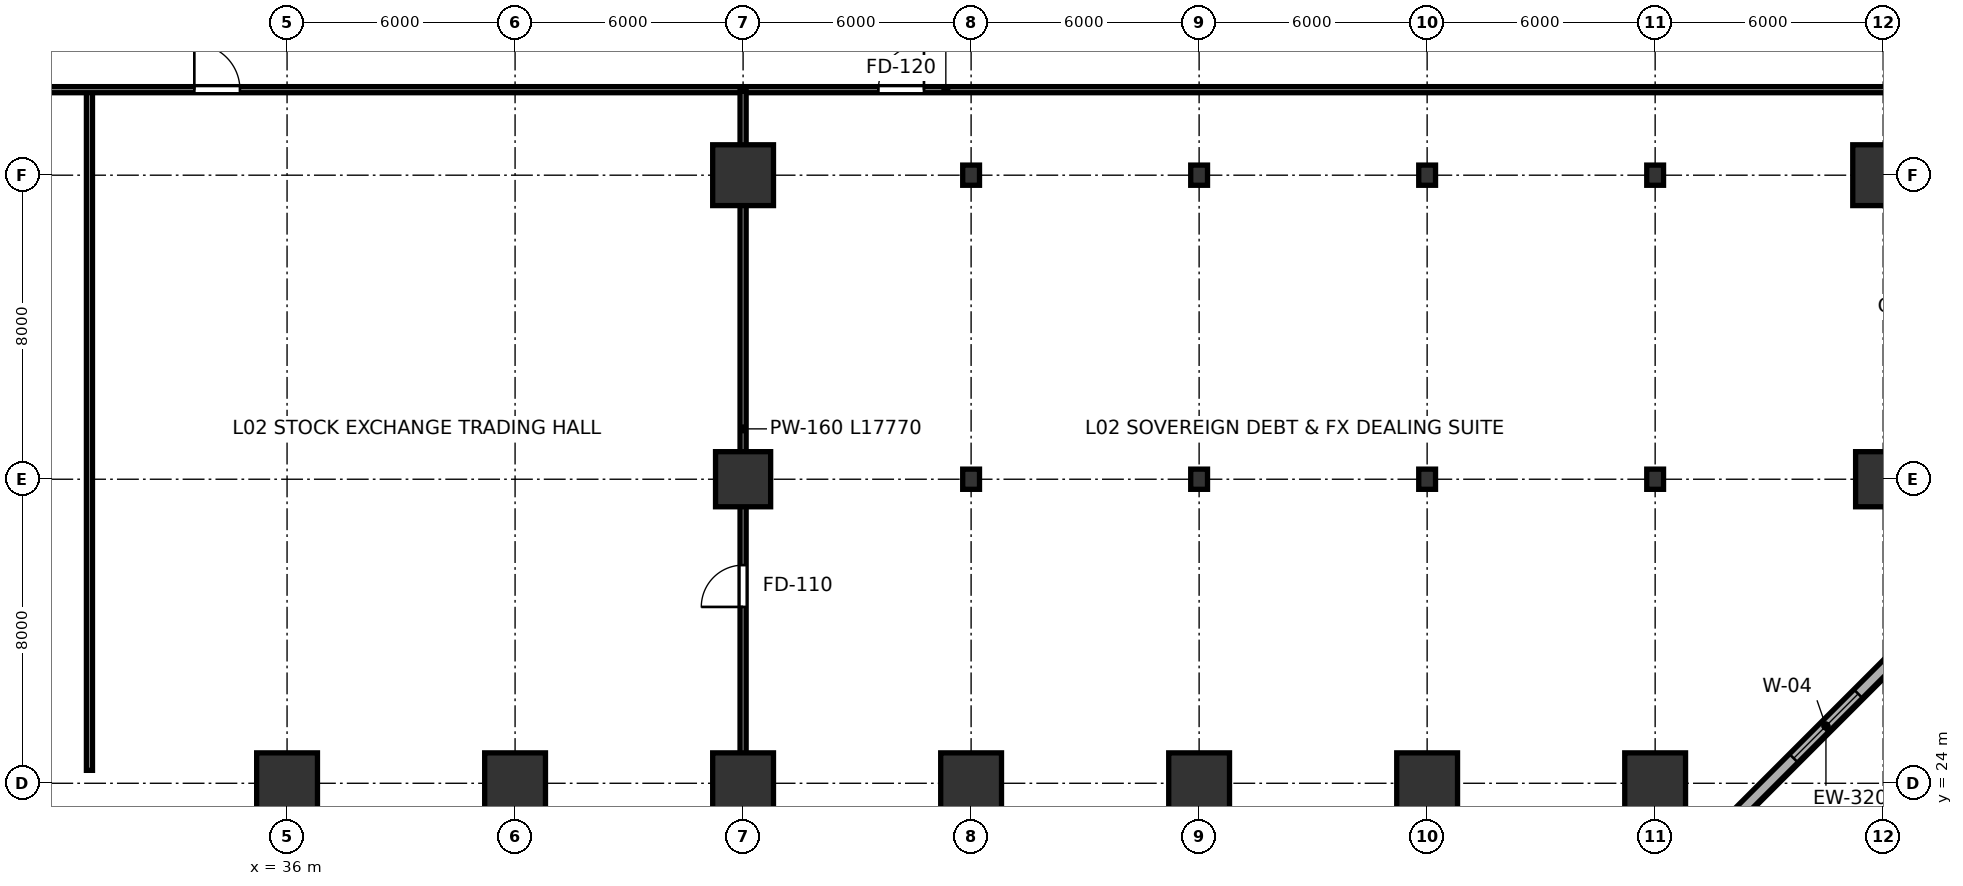
"""IFC4 building model, lengths in metres.
Left out: names, types, materials, properties, quantities, classifications, styles, units other than length and angle.
Written with IfcOpenShell. Run it as: python <this file> out.ifc"""

import sys

from ifc_helpers import new_model, si_unit, direction, frame, frame_2d, origin, origin_2d, place, context, subcontext, project, spatial, rectangle, i_section, extrude, source, transform, mapped, element, fill, save


model = new_model("IFC4")
c1 = context("Model", 3, precision=1e-05, world=origin(), true_north=direction((0.0, 1.0)))
c2 = subcontext(c1, "Body", "Model", "MODEL_VIEW")
j1 = project(units=[si_unit("LENGTHUNIT", "METRE"), si_unit("PLANEANGLEUNIT", "RADIAN")], contexts=[c1])
p1 = place(None, origin())
s1 = spatial("IfcSite", under=j1, at=p1, CompositionType="ELEMENT")
p2 = place(p1, origin())
s2 = spatial("IfcBuilding", under=s1, at=p2, CompositionType="ELEMENT")
p3 = place(p2, frame((0.0, 0.0, 6.0)))
s3 = spatial("IfcBuildingStorey", under=s2, at=p3, CompositionType="ELEMENT", Elevation=6.0)
m1 = source(origin(), c2, "Body", "SweptSolid", [
    extrude(rectangle(XDim=1.6, YDim=1.6, at=origin_2d()), origin(), (0.0, 0.0, 1.0), 5.999),
])
for number, where, z_axis, x_axis in (
    (1, (36.0, 24.0, 0.001), (0.0, 0.0, 1.0), (1.0, 0.0, 0.0)),
    (2, (42.0, 24.0, 0.001), (0.0, 0.0, 1.0), (1.0, 0.0, 0.0)),
    (3, (48.0, 24.0, 0.001), (0.0, 0.0, 1.0), (1.0, 0.0, 0.0)),
):
    element("IfcColumn", number, at=place(p3, frame(where, z_axis=z_axis, x_axis=x_axis)), inside=s3, PredefinedType="COLUMN", context=c2, shape_type="MappedRepresentation", body=[
        mapped(m1, transform((0.0, 0.0, 0.0), scale=1.0)),
    ])
m2 = source(origin(), c2, "Body", "SweptSolid", [
    extrude(rectangle(XDim=1.45, YDim=1.45, at=origin_2d()), origin(), (0.0, 0.0, 1.0), 5.999),
])
p4 = place(p3, frame((48.0, 32.0, 0.001), z_axis=(0.0, 0.0, 1.0), x_axis=(1.0, 0.0, 0.0)))
e4 = element("IfcColumn", 4, at=p4, inside=s3, PredefinedType="COLUMN", context=c2, shape_type="MappedRepresentation", body=[
    mapped(m2, transform((0.0, 0.0, 0.0), scale=1.0)),
])
m3 = source(origin(), c2, "Body", "SweptSolid", [
    extrude(rectangle(XDim=1.6, YDim=1.6, at=origin_2d()), origin(), (0.0, 0.0, 1.0), 5.999),
])
p5 = place(p3, frame((48.0, 40.0, 0.001), z_axis=(0.0, 0.0, 1.0), x_axis=(1.0, 0.0, 0.0)))
e5 = element("IfcColumn", 5, at=p5, inside=s3, PredefinedType="COLUMN", context=c2, shape_type="MappedRepresentation", body=[
    mapped(m3, transform((0.0, 0.0, 0.0), scale=1.0)),
])
p6 = place(p3, frame((54.0, 24.0, 0.001), z_axis=(0.0, 0.0, 1.0), x_axis=(1.0, 0.0, 0.0)))
e6 = element("IfcColumn", 6, at=p6, inside=s3, PredefinedType="COLUMN", context=c2, shape_type="MappedRepresentation", body=[
    mapped(m1, transform((0.0, 0.0, 0.0), scale=1.0)),
])
m4 = source(origin(), c2, "Body", "SweptSolid", [
    extrude(i_section(OverallWidth=0.442, OverallDepth=0.531, WebThickness=0.066, FlangeThickness=0.106, FilletRadius=0.015, at=origin_2d()), origin(), (0.0, 0.0, 1.0), 5.999),
])
for number, where, z_axis, x_axis in (
    (7, (54.0, 32.0, 0.001), (0.0, 0.0, 1.0), (1.0, 0.0, 0.0)),
    (8, (54.0, 40.0, 0.001), (0.0, 0.0, 1.0), (1.0, 0.0, 0.0)),
):
    element("IfcColumn", number, at=place(p3, frame(where, z_axis=z_axis, x_axis=x_axis)), inside=s3, PredefinedType="COLUMN", context=c2, shape_type="MappedRepresentation", body=[
        mapped(m4, transform((0.0, 0.0, 0.0), scale=1.0)),
    ])
p7 = place(p3, frame((60.0, 24.0, 0.001), z_axis=(0.0, 0.0, 1.0), x_axis=(1.0, 0.0, 0.0)))
e9 = element("IfcColumn", 9, at=p7, inside=s3, PredefinedType="COLUMN", context=c2, shape_type="MappedRepresentation", body=[
    mapped(m1, transform((0.0, 0.0, 0.0), scale=1.0)),
])
for number, where, z_axis, x_axis in (
    (10, (60.0, 32.0, 0.001), (0.0, 0.0, 1.0), (1.0, 0.0, 0.0)),
    (11, (60.0, 40.0, 0.001), (0.0, 0.0, 1.0), (1.0, 0.0, 0.0)),
):
    element("IfcColumn", number, at=place(p3, frame(where, z_axis=z_axis, x_axis=x_axis)), inside=s3, PredefinedType="COLUMN", context=c2, shape_type="MappedRepresentation", body=[
        mapped(m4, transform((0.0, 0.0, 0.0), scale=1.0)),
    ])
p8 = place(p3, frame((66.0, 24.0, 0.001), z_axis=(0.0, 0.0, 1.0), x_axis=(1.0, 0.0, 0.0)))
e12 = element("IfcColumn", 12, at=p8, inside=s3, PredefinedType="COLUMN", context=c2, shape_type="MappedRepresentation", body=[
    mapped(m1, transform((0.0, 0.0, 0.0), scale=1.0)),
])
for number, where, z_axis, x_axis in (
    (13, (66.0, 32.0, 0.001), (0.0, 0.0, 1.0), (1.0, 0.0, 0.0)),
    (14, (66.0, 40.0, 0.001), (0.0, 0.0, 1.0), (1.0, 0.0, 0.0)),
):
    element("IfcColumn", number, at=place(p3, frame(where, z_axis=z_axis, x_axis=x_axis)), inside=s3, PredefinedType="COLUMN", context=c2, shape_type="MappedRepresentation", body=[
        mapped(m4, transform((0.0, 0.0, 0.0), scale=1.0)),
    ])
p9 = place(p3, frame((72.0, 24.0, 0.001), z_axis=(0.0, 0.0, 1.0), x_axis=(1.0, 0.0, 0.0)))
e15 = element("IfcColumn", 15, at=p9, inside=s3, PredefinedType="COLUMN", context=c2, shape_type="MappedRepresentation", body=[
    mapped(m1, transform((0.0, 0.0, 0.0), scale=1.0)),
])
for number, where, z_axis, x_axis in (
    (16, (72.0, 32.0, 0.001), (0.0, 0.0, 1.0), (1.0, 0.0, 0.0)),
    (17, (72.0, 40.0, 0.001), (0.0, 0.0, 1.0), (1.0, 0.0, 0.0)),
):
    element("IfcColumn", number, at=place(p3, frame(where, z_axis=z_axis, x_axis=x_axis)), inside=s3, PredefinedType="COLUMN", context=c2, shape_type="MappedRepresentation", body=[
        mapped(m4, transform((0.0, 0.0, 0.0), scale=1.0)),
    ])
m5 = source(origin(), c2, "Body", "SweptSolid", [
    extrude(rectangle(XDim=1.45, YDim=1.45, at=origin_2d()), origin(), (0.0, 0.0, 1.0), 5.999),
])
p10 = place(p3, frame((78.0, 32.0, 0.001), z_axis=(0.0, 0.0, 1.0), x_axis=(1.0, 0.0, 0.0)))
e18 = element("IfcColumn", 18, at=p10, inside=s3, PredefinedType="COLUMN", context=c2, shape_type="MappedRepresentation", body=[
    mapped(m5, transform((0.0, 0.0, 0.0), scale=1.0)),
])
p11 = place(p3, frame((78.0, 40.0, 0.001), z_axis=(0.0, 0.0, 1.0), x_axis=(1.0, 0.0, 0.0)))
e19 = element("IfcColumn", 19, at=p11, inside=s3, PredefinedType="COLUMN", context=c2, shape_type="MappedRepresentation", body=[
    mapped(m1, transform((0.0, 0.0, 0.0), scale=1.0)),
])
p12 = place(p3, frame((74.244, 23.256, 0.0), z_axis=(0.0, 0.0, 1.0), x_axis=(0.707106781187, 0.707106781187, 0.0)))
e20 = element("IfcWall", 20, at=p12, inside=s3, PredefinedType="SOLIDWALL", context=c2, shape_type="SweptSolid", body=[
    extrude(rectangle(XDim=6.364, YDim=0.32, at=frame_2d((3.182, 0.0))), origin(), (0.0, 0.0, 1.0), 5.74),
])
p13 = place(p12, frame((1.982, 0.0, 0.65)))
e21 = element("IfcOpeningElement", 21, at=p13, cuts=e20, PredefinedType="OPENING", context=c2, shape_type="SweptSolid", body=[
    extrude(rectangle(XDim=2.4, YDim=2.2, at=frame_2d((1.2, 1.1))), frame((0.0, 0.17, 0.0), z_axis=(0.0, -1.0, 0.0), x_axis=(1.0, 0.0, 0.0)), (0.0, 0.0, 1.0), 0.34),
])
p14 = place(p3, frame((30.8, 24.34, 0.0), z_axis=(0.0, 0.0, 1.0), x_axis=(0.0, 1.0, 0.0)))
e22 = element("IfcWall", 22, at=p14, inside=s3, PredefinedType="PARTITIONING", context=c2, shape_type="SweptSolid", body=[
    extrude(rectangle(XDim=17.87, YDim=0.16, at=frame_2d((8.935, 0.0))), origin(), (0.0, 0.0, 1.0), 4.375),
])
p15 = place(p3, frame((27.06, 42.25, 0.0), z_axis=(0.0, 0.0, 1.0), x_axis=(1.0, 0.0, 0.0)))
e23 = element("IfcWall", 23, at=p15, inside=s3, PredefinedType="PARTITIONING", context=c2, shape_type="SweptSolid", body=[
    extrude(rectangle(XDim=52.55, YDim=0.16, at=frame_2d((26.275, 0.0))), origin(), (0.0, 0.0, 1.0), 4.875),
])
p16 = place(p15, frame((6.5, 0.0, 0.0)))
e24 = element("IfcOpeningElement", 24, at=p16, cuts=e23, PredefinedType="OPENING", context=c2, shape_type="SweptSolid", body=[
    extrude(rectangle(XDim=1.2, YDim=2.2, at=frame_2d((0.6, 1.1))), frame((0.0, 0.09, 0.0), z_axis=(0.0, -1.0, 0.0), x_axis=(1.0, 0.0, 0.0)), (0.0, 0.0, 1.0), 0.18),
])
p17 = place(p15, frame((24.5, 0.0, 0.0)))
e25 = element("IfcOpeningElement", 25, at=p17, cuts=e23, PredefinedType="OPENING", context=c2, shape_type="SweptSolid", body=[
    extrude(rectangle(XDim=1.2, YDim=2.2, at=frame_2d((0.6, 1.1))), frame((0.0, 0.09, 0.0), z_axis=(0.0, -1.0, 0.0), x_axis=(1.0, 0.0, 0.0)), (0.0, 0.0, 1.0), 0.18),
])
p18 = place(p3, frame((48.0, 24.44, 0.0), z_axis=(0.0, 0.0, 1.0), x_axis=(0.0, 1.0, 0.0)))
e26 = element("IfcWall", 26, at=p18, inside=s3, PredefinedType="PARTITIONING", context=c2, shape_type="SweptSolid", body=[
    extrude(rectangle(XDim=17.77, YDim=0.16, at=frame_2d((8.885, 0.0))), origin(), (0.0, 0.0, 1.0), 4.375),
])
p19 = place(p18, frame((4.2, 0.0, 0.0)))
e27 = element("IfcOpeningElement", 27, at=p19, cuts=e26, PredefinedType="OPENING", context=c2, shape_type="SweptSolid", body=[
    extrude(rectangle(XDim=1.1, YDim=2.2, at=frame_2d((0.55, 1.1))), frame((0.0, 0.09, 0.0), z_axis=(0.0, -1.0, 0.0), x_axis=(1.0, 0.0, 0.0)), (0.0, 0.0, 1.0), 0.18),
])
m6 = source(origin(), c2, "Body", "SweptSolid", [
    extrude(rectangle(XDim=2.4, YDim=2.2, at=frame_2d((1.2, 1.1))), frame((0.0, 0.03, 0.0), z_axis=(0.0, -1.0, 0.0), x_axis=(1.0, 0.0, 0.0)), (0.0, 0.0, 1.0), 0.06),
])
p20 = place(p13, origin())
e28 = element("IfcWindow", 28, at=p20, inside=s3, PartitioningType="DOUBLE_PANEL_VERTICAL", PredefinedType="WINDOW", context=c2, shape_type="MappedRepresentation", body=[
    mapped(m6, transform((0.0, 0.0, 0.0), scale=1.0)),
])
fill(e21, e28)
m7 = source(origin(), c2, "Body", "SweptSolid", [
    extrude(rectangle(XDim=1.2, YDim=2.2, at=frame_2d((0.6, 1.1))), frame((0.0, 0.025, 0.0), z_axis=(0.0, -1.0, 0.0), x_axis=(1.0, 0.0, 0.0)), (0.0, 0.0, 1.0), 0.05),
])
p21 = place(p16, origin())
e29 = element("IfcDoor", 29, at=p21, inside=s3, OperationType="SINGLE_SWING_LEFT", PredefinedType="DOOR", context=c2, shape_type="MappedRepresentation", body=[
    mapped(m7, transform((0.0, 0.0, 0.0), scale=1.0)),
])
fill(e24, e29)
p22 = place(p17, origin())
e30 = element("IfcDoor", 30, at=p22, inside=s3, OperationType="SINGLE_SWING_RIGHT", PredefinedType="DOOR", context=c2, shape_type="MappedRepresentation", body=[
    mapped(m7, transform((0.0, 0.0, 0.0), scale=1.0)),
])
fill(e25, e30)
m8 = source(origin(), c2, "Body", "SweptSolid", [
    extrude(rectangle(XDim=1.1, YDim=2.2, at=frame_2d((0.55, 1.1))), frame((0.0, 0.025, 0.0), z_axis=(0.0, -1.0, 0.0), x_axis=(1.0, 0.0, 0.0)), (0.0, 0.0, 1.0), 0.05),
])
p23 = place(p19, origin())
e31 = element("IfcDoor", 31, at=p23, inside=s3, OperationType="SINGLE_SWING_LEFT", PredefinedType="DOOR", context=c2, shape_type="MappedRepresentation", body=[
    mapped(m8, transform((0.0, 0.0, 0.0), scale=1.0)),
])
fill(e27, e31)
save(model, sys.argv[1])
